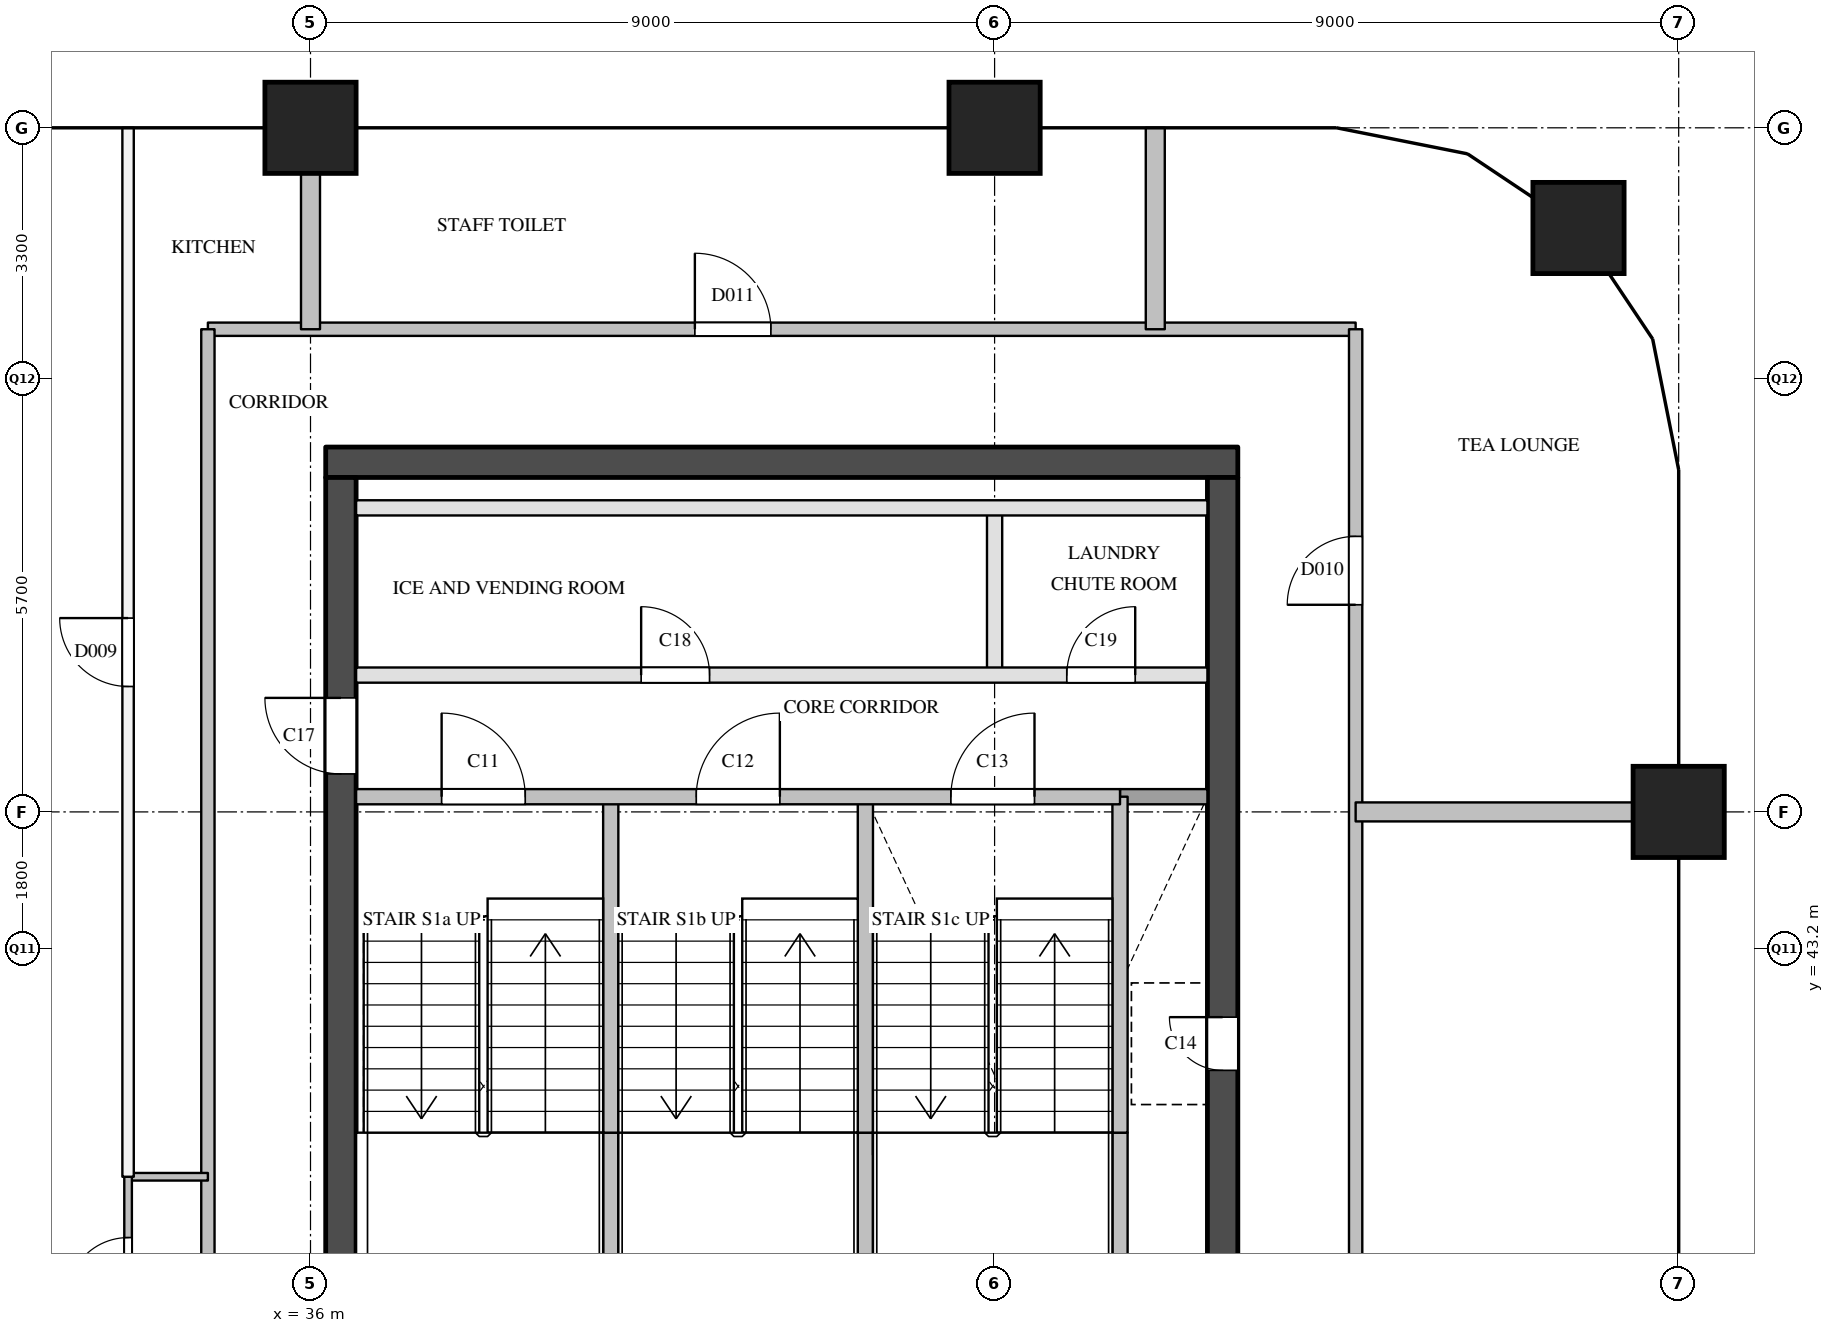
"""IFC4 building model, lengths in metres.
Left out: names, types, materials, properties, quantities, classifications, styles, units other than length and angle.
Written with IfcOpenShell. Run it as: python <this file> out.ifc"""

import sys

from ifc_helpers import new_model, si_unit, direction, frame, frame_2d, origin, origin_2d, place, context, subcontext, project, spatial, rectangle, extrude, element, fill, save


model = new_model("IFC4")
c1 = context("Model", 3, precision=1e-05, world=origin(), true_north=direction((0.0, 1.0)))
c2 = subcontext(c1, "Body", "Model", "MODEL_VIEW")
j1 = project(units=[si_unit("LENGTHUNIT", "METRE"), si_unit("PLANEANGLEUNIT", "RADIAN")], contexts=[c1])
p1 = place(None, origin())
s1 = spatial("IfcSite", under=j1, at=p1, CompositionType="ELEMENT")
p2 = place(p1, origin())
s2 = spatial("IfcBuilding", under=s1, at=p2, CompositionType="ELEMENT")
p3 = place(p2, frame((0.0, 0.0, 269.6)))
s3 = spatial("IfcBuildingStorey", under=s2, at=p3, CompositionType="ELEMENT", Elevation=269.6)
for number, where, z_axis, x_axis in (
    (1, (36.0, 54.0, 0.0), (0.0, 0.0, 1.0), (1.0, 0.0, 0.0)),
    (2, (45.0, 54.0, 0.0), (0.0, 0.0, 1.0), (1.0, 0.0, 0.0)),
    (3, (54.0, 45.0, 0.0), (0.0, 0.0, 1.0), (1.0, 0.0, 0.0)),
    (4, (52.682, 52.682, 0.0), (0.0, 0.0, 1.0), (1.0, 0.0, 0.0)),
):
    element("IfcColumn", number, at=place(p3, frame(where, z_axis=z_axis, x_axis=x_axis)), inside=s3, PredefinedType="COLUMN", context=c2, shape_type="SweptSolid", body=[
        extrude(rectangle(XDim=1.2, YDim=1.2, at=origin_2d()), origin(), (0.0, 0.0, 1.0), 3.9),
    ])
p4 = place(p3, frame((36.2, 49.6, 0.0), z_axis=(0.0, 0.0, 1.0), x_axis=(1.0, 0.0, 0.0)))
e5 = element("IfcWall", 5, at=p4, inside=s3, PredefinedType="SHEAR", context=c2, shape_type="SweptSolid", body=[
    extrude(rectangle(XDim=12.0, YDim=0.4, at=frame_2d((6.0, 0.0))), origin(), (0.0, 0.0, 1.0), 3.6),
])
p5 = place(p3, frame((36.4, 29.1, 0.0), z_axis=(0.0, 0.0, 1.0), x_axis=(0.0, 1.0, 0.0)))
e6 = element("IfcWall", 6, at=p5, inside=s3, PredefinedType="SHEAR", context=c2, shape_type="SweptSolid", body=[
    extrude(rectangle(XDim=20.3, YDim=0.4, at=frame_2d((10.15, 0.0))), origin(), (0.0, 0.0, 1.0), 3.6),
])
p6 = place(p5, frame((3.6, 0.0, 0.0)))
e7 = element("IfcOpeningElement", 7, at=p6, cuts=e6, PredefinedType="OPENING", context=c2, shape_type="SweptSolid", body=[
    extrude(rectangle(XDim=1.8, YDim=2.1, at=frame_2d((0.9, 1.05))), frame((0.0, 0.21, 0.0), z_axis=(0.0, -1.0, 0.0), x_axis=(1.0, 0.0, 0.0)), (0.0, 0.0, 1.0), 0.42),
])
p7 = place(p5, frame((16.4, 0.0, 0.0)))
e8 = element("IfcOpeningElement", 8, at=p7, cuts=e6, PredefinedType="OPENING", context=c2, shape_type="SweptSolid", body=[
    extrude(rectangle(XDim=1.0, YDim=2.1, at=frame_2d((0.5, 1.05))), frame((0.0, 0.21, 0.0), z_axis=(0.0, -1.0, 0.0), x_axis=(1.0, 0.0, 0.0)), (0.0, 0.0, 1.0), 0.42),
])
p8 = place(p3, frame((48.0, 29.1, 0.0), z_axis=(0.0, 0.0, 1.0), x_axis=(0.0, 1.0, 0.0)))
e9 = element("IfcWall", 9, at=p8, inside=s3, PredefinedType="SHEAR", context=c2, shape_type="SweptSolid", body=[
    extrude(rectangle(XDim=20.3, YDim=0.4, at=frame_2d((10.15, 0.0))), origin(), (0.0, 0.0, 1.0), 3.6),
])
p9 = place(p8, frame((12.5, 0.0, 0.0)))
e10 = element("IfcOpeningElement", 10, at=p9, cuts=e9, PredefinedType="OPENING", context=c2, shape_type="SweptSolid", body=[
    extrude(rectangle(XDim=0.7, YDim=2.1, at=frame_2d((0.35, 1.05))), frame((0.0, 0.21, 0.0), z_axis=(0.0, -1.0, 0.0), x_axis=(1.0, 0.0, 0.0)), (0.0, 0.0, 1.0), 0.42),
])
p10 = place(p8, frame((3.9, 0.0, 0.0)))
e11 = element("IfcOpeningElement", 11, at=p10, cuts=e9, PredefinedType="OPENING", context=c2, shape_type="SweptSolid", body=[
    extrude(rectangle(XDim=1.8, YDim=2.1, at=frame_2d((0.9, 1.05))), frame((0.0, 0.21, 0.0), z_axis=(0.0, -1.0, 0.0), x_axis=(1.0, 0.0, 0.0)), (0.0, 0.0, 1.0), 0.42),
])
p11 = place(p3, frame((39.95, 39.0, 0.0), z_axis=(0.0, 0.0, 1.0), x_axis=(0.0, 1.0, 0.0)))
e12 = element("IfcWall", 12, at=p11, inside=s3, PredefinedType="SOLIDWALL", context=c2, shape_type="SweptSolid", body=[
    extrude(rectangle(XDim=1.78, YDim=0.2, at=frame_2d((0.89, 0.0))), origin(), (0.0, 0.0, 1.0), 3.6),
])
p12 = place(p3, frame((39.95, 40.78, 0.0), z_axis=(0.0, 0.0, 1.0), x_axis=(0.0, 1.0, 0.0)))
e13 = element("IfcWall", 13, at=p12, inside=s3, PredefinedType="SOLIDWALL", context=c2, shape_type="SweptSolid", body=[
    extrude(rectangle(XDim=4.42, YDim=0.2, at=frame_2d((2.21, 0.0))), origin(), (0.0, 0.0, 1.0), 3.6),
])
p13 = place(p3, frame((43.3, 39.0, 0.0), z_axis=(0.0, 0.0, 1.0), x_axis=(0.0, 1.0, 0.0)))
e14 = element("IfcWall", 14, at=p13, inside=s3, PredefinedType="SOLIDWALL", context=c2, shape_type="SweptSolid", body=[
    extrude(rectangle(XDim=1.78, YDim=0.2, at=frame_2d((0.89, 0.0))), origin(), (0.0, 0.0, 1.0), 3.6),
])
p14 = place(p3, frame((43.3, 40.78, 0.0), z_axis=(0.0, 0.0, 1.0), x_axis=(0.0, 1.0, 0.0)))
e15 = element("IfcWall", 15, at=p14, inside=s3, PredefinedType="SOLIDWALL", context=c2, shape_type="SweptSolid", body=[
    extrude(rectangle(XDim=4.42, YDim=0.2, at=frame_2d((2.21, 0.0))), origin(), (0.0, 0.0, 1.0), 3.6),
])
p15 = place(p3, frame((45.0, 46.8, 0.0), z_axis=(0.0, 0.0, 1.0), x_axis=(0.0, 1.0, 0.0)))
e16 = element("IfcWall", 16, at=p15, inside=s3, PredefinedType="PARTITIONING", context=c2, shape_type="SweptSolid", body=[
    extrude(rectangle(XDim=2.2, YDim=0.2, at=frame_2d((1.1, 0.0))), origin(), (0.0, 0.0, 1.0), 3.6),
])
p16 = place(p3, frame((46.65, 39.0, 0.0), z_axis=(0.0, 0.0, 1.0), x_axis=(0.0, 1.0, 0.0)))
e17 = element("IfcWall", 17, at=p16, inside=s3, PredefinedType="SOLIDWALL", context=c2, shape_type="SweptSolid", body=[
    extrude(rectangle(XDim=1.78, YDim=0.2, at=frame_2d((0.89, 0.0))), origin(), (0.0, 0.0, 1.0), 3.6),
])
p17 = place(p3, frame((46.65, 40.78, 0.0), z_axis=(0.0, 0.0, 1.0), x_axis=(0.0, 1.0, 0.0)))
e18 = element("IfcWall", 18, at=p17, inside=s3, PredefinedType="SOLIDWALL", context=c2, shape_type="SweptSolid", body=[
    extrude(rectangle(XDim=4.42, YDim=0.2, at=frame_2d((2.21, 0.0))), origin(), (0.0, 0.0, 1.0), 3.6),
])
p18 = place(p3, frame((46.65, 45.2, 0.0), z_axis=(0.0, 0.0, 1.0), x_axis=(1.0, 0.0, 0.0)))
e19 = element("IfcWall", 19, at=p18, inside=s3, PredefinedType="SOLIDWALL", context=c2, shape_type="SweptSolid", body=[
    extrude(rectangle(XDim=1.15, YDim=0.2, at=frame_2d((0.575, 0.0))), origin(), (0.0, 0.0, 1.0), 3.6),
])
p19 = place(p3, frame((36.6, 45.2, 0.0), z_axis=(0.0, 0.0, 1.0), x_axis=(1.0, 0.0, 0.0)))
e20 = element("IfcWall", 20, at=p19, inside=s3, PredefinedType="SOLIDWALL", context=c2, shape_type="SweptSolid", body=[
    extrude(rectangle(XDim=10.05, YDim=0.2, at=frame_2d((5.025, 0.0))), origin(), (0.0, 0.0, 1.0), 3.6),
])
p20 = place(p19, frame((1.125, 0.0, 0.0)))
e21 = element("IfcOpeningElement", 21, at=p20, cuts=e20, PredefinedType="OPENING", context=c2, shape_type="SweptSolid", body=[
    extrude(rectangle(XDim=1.1, YDim=2.1, at=frame_2d((0.55, 1.05))), frame((0.0, 0.11, 0.0), z_axis=(0.0, -1.0, 0.0), x_axis=(1.0, 0.0, 0.0)), (0.0, 0.0, 1.0), 0.22),
])
p21 = place(p19, frame((4.475, 0.0, 0.0)))
e22 = element("IfcOpeningElement", 22, at=p21, cuts=e20, PredefinedType="OPENING", context=c2, shape_type="SweptSolid", body=[
    extrude(rectangle(XDim=1.1, YDim=2.1, at=frame_2d((0.55, 1.05))), frame((0.0, 0.11, 0.0), z_axis=(0.0, -1.0, 0.0), x_axis=(1.0, 0.0, 0.0)), (0.0, 0.0, 1.0), 0.22),
])
p22 = place(p19, frame((7.825, 0.0, 0.0)))
e23 = element("IfcOpeningElement", 23, at=p22, cuts=e20, PredefinedType="OPENING", context=c2, shape_type="SweptSolid", body=[
    extrude(rectangle(XDim=1.1, YDim=2.1, at=frame_2d((0.55, 1.05))), frame((0.0, 0.11, 0.0), z_axis=(0.0, -1.0, 0.0), x_axis=(1.0, 0.0, 0.0)), (0.0, 0.0, 1.0), 0.22),
])
p23 = place(p3, frame((36.6, 46.8, 0.0), z_axis=(0.0, 0.0, 1.0), x_axis=(1.0, 0.0, 0.0)))
e24 = element("IfcWall", 24, at=p23, inside=s3, PredefinedType="PARTITIONING", context=c2, shape_type="SweptSolid", body=[
    extrude(rectangle(XDim=11.2, YDim=0.2, at=frame_2d((5.6, 0.0))), origin(), (0.0, 0.0, 1.0), 3.6),
])
p24 = place(p23, frame((3.75, 0.0, 0.0)))
e25 = element("IfcOpeningElement", 25, at=p24, cuts=e24, PredefinedType="OPENING", context=c2, shape_type="SweptSolid", body=[
    extrude(rectangle(XDim=0.9, YDim=2.1, at=frame_2d((0.45, 1.05))), frame((0.0, 0.11, 0.0), z_axis=(0.0, -1.0, 0.0), x_axis=(1.0, 0.0, 0.0)), (0.0, 0.0, 1.0), 0.22),
])
p25 = place(p23, frame((9.35, 0.0, 0.0)))
e26 = element("IfcOpeningElement", 26, at=p25, cuts=e24, PredefinedType="OPENING", context=c2, shape_type="SweptSolid", body=[
    extrude(rectangle(XDim=0.9, YDim=2.1, at=frame_2d((0.45, 1.05))), frame((0.0, 0.11, 0.0), z_axis=(0.0, -1.0, 0.0), x_axis=(1.0, 0.0, 0.0)), (0.0, 0.0, 1.0), 0.22),
])
p26 = place(p3, frame((36.6, 49.0, 0.0), z_axis=(0.0, 0.0, 1.0), x_axis=(1.0, 0.0, 0.0)))
e27 = element("IfcWall", 27, at=p26, inside=s3, PredefinedType="PARTITIONING", context=c2, shape_type="SweptSolid", body=[
    extrude(rectangle(XDim=11.2, YDim=0.2, at=frame_2d((5.6, 0.0))), origin(), (0.0, 0.0, 1.0), 3.6),
])
p27 = place(p3, frame((34.65, 51.35, 0.0), z_axis=(0.0, 0.0, 1.0), x_axis=(1.0, 0.0, 0.0)))
e28 = element("IfcWall", 28, at=p27, inside=s3, PredefinedType="PARTITIONING", context=c2, shape_type="SweptSolid", body=[
    extrude(rectangle(XDim=15.1, YDim=0.175, at=frame_2d((7.55, 0.0))), origin(), (0.0, 0.0, 1.0), 3.6),
])
p28 = place(p27, frame((6.407, 0.0, 0.0)))
e29 = element("IfcOpeningElement", 29, at=p28, cuts=e28, PredefinedType="OPENING", context=c2, shape_type="SweptSolid", body=[
    extrude(rectangle(XDim=1.0, YDim=2.1, at=frame_2d((0.5, 1.05))), frame((0.0, 0.097, 0.0), z_axis=(0.0, -1.0, 0.0), x_axis=(1.0, 0.0, 0.0)), (0.0, 0.0, 1.0), 0.195),
])
p29 = place(p3, frame((34.65, 28.5, 0.0), z_axis=(0.0, 0.0, 1.0), x_axis=(0.0, 1.0, 0.0)))
e30 = element("IfcWall", 30, at=p29, inside=s3, PredefinedType="PARTITIONING", context=c2, shape_type="SweptSolid", body=[
    extrude(rectangle(XDim=22.85, YDim=0.175, at=frame_2d((11.425, 0.0))), origin(), (0.0, 0.0, 1.0), 3.6),
])
p30 = place(p29, frame((6.1, 0.0, 0.0)))
e31 = element("IfcOpeningElement", 31, at=p30, cuts=e30, PredefinedType="OPENING", context=c2, shape_type="SweptSolid", body=[
    extrude(rectangle(XDim=1.0, YDim=2.1, at=frame_2d((0.5, 1.05))), frame((0.0, 0.097, 0.0), z_axis=(0.0, -1.0, 0.0), x_axis=(1.0, 0.0, 0.0)), (0.0, 0.0, 1.0), 0.195),
])
p31 = place(p29, frame((7.9, 0.0, 0.0)))
e32 = element("IfcOpeningElement", 32, at=p31, cuts=e30, PredefinedType="OPENING", context=c2, shape_type="SweptSolid", body=[
    extrude(rectangle(XDim=1.0, YDim=2.1, at=frame_2d((0.5, 1.05))), frame((0.0, 0.097, 0.0), z_axis=(0.0, -1.0, 0.0), x_axis=(1.0, 0.0, 0.0)), (0.0, 0.0, 1.0), 0.195),
])
p32 = place(p3, frame((49.75, 28.5, 0.0), z_axis=(0.0, 0.0, 1.0), x_axis=(0.0, 1.0, 0.0)))
e33 = element("IfcWall", 33, at=p32, inside=s3, PredefinedType="PARTITIONING", context=c2, shape_type="SweptSolid", body=[
    extrude(rectangle(XDim=22.85, YDim=0.175, at=frame_2d((11.425, 0.0))), origin(), (0.0, 0.0, 1.0), 3.6),
])
p33 = place(p32, frame((7.8, 0.0, 0.0)))
e34 = element("IfcOpeningElement", 34, at=p33, cuts=e33, PredefinedType="OPENING", context=c2, shape_type="SweptSolid", body=[
    extrude(rectangle(XDim=0.9, YDim=2.1, at=frame_2d((0.45, 1.05))), frame((0.0, 0.097, 0.0), z_axis=(0.0, -1.0, 0.0), x_axis=(1.0, 0.0, 0.0)), (0.0, 0.0, 1.0), 0.195),
])
p34 = place(p32, frame((19.225, 0.0, 0.0)))
e35 = element("IfcOpeningElement", 35, at=p34, cuts=e33, PredefinedType="OPENING", context=c2, shape_type="SweptSolid", body=[
    extrude(rectangle(XDim=0.9, YDim=2.1, at=frame_2d((0.45, 1.05))), frame((0.0, 0.097, 0.0), z_axis=(0.0, -1.0, 0.0), x_axis=(1.0, 0.0, 0.0)), (0.0, 0.0, 1.0), 0.195),
])
p35 = place(p3, frame((33.6, 40.2, 0.0), z_axis=(0.0, 0.0, 1.0), x_axis=(0.0, 1.0, 0.0)))
e36 = element("IfcWall", 36, at=p35, inside=s3, PredefinedType="PARTITIONING", context=c2, shape_type="SweptSolid", body=[
    extrude(rectangle(XDim=13.8, YDim=0.15, at=frame_2d((6.9, 0.0))), origin(), (0.0, 0.0, 1.0), 2.6),
])
p36 = place(p35, frame((6.45, 0.0, 0.0)))
e37 = element("IfcOpeningElement", 37, at=p36, cuts=e36, PredefinedType="OPENING", context=c2, shape_type="SweptSolid", body=[
    extrude(rectangle(XDim=0.9, YDim=2.1, at=frame_2d((0.45, 1.05))), frame((0.0, 0.085, 0.0), z_axis=(0.0, -1.0, 0.0), x_axis=(1.0, 0.0, 0.0)), (0.0, 0.0, 1.0), 0.17),
])
p37 = place(p3, frame((49.75, 45.0, 0.0), z_axis=(0.0, 0.0, 1.0), x_axis=(1.0, 0.0, 0.0)))
e38 = element("IfcWall", 38, at=p37, inside=s3, PredefinedType="PARTITIONING", context=c2, shape_type="SweptSolid", body=[
    extrude(rectangle(XDim=4.25, YDim=0.25, at=frame_2d((2.125, 0.0))), origin(), (0.0, 0.0, 1.0), 3.6),
])
p38 = place(p3, frame((36.0, 51.35, 0.0), z_axis=(0.0, 0.0, 1.0), x_axis=(0.0, 1.0, 0.0)))
e39 = element("IfcWall", 39, at=p38, inside=s3, PredefinedType="PARTITIONING", context=c2, shape_type="SweptSolid", body=[
    extrude(rectangle(XDim=2.65, YDim=0.25, at=frame_2d((1.325, 0.0))), origin(), (0.0, 0.0, 1.0), 3.6),
])
p39 = place(p3, frame((47.114, 51.35, 0.0), z_axis=(0.0, 0.0, 1.0), x_axis=(0.0, 1.0, 0.0)))
e40 = element("IfcWall", 40, at=p39, inside=s3, PredefinedType="PARTITIONING", context=c2, shape_type="SweptSolid", body=[
    extrude(rectangle(XDim=2.65, YDim=0.25, at=frame_2d((1.325, 0.0))), origin(), (0.0, 0.0, 1.0), 2.6),
])
p40 = place(p3, frame((33.6, 40.2, 0.0), z_axis=(0.0, 0.0, 1.0), x_axis=(1.0, 0.0, 0.0)))
e41 = element("IfcWall", 41, at=p40, inside=s3, PredefinedType="PARTITIONING", context=c2, shape_type="SweptSolid", body=[
    extrude(rectangle(XDim=1.05, YDim=0.1, at=frame_2d((0.525, 0.0))), origin(), (0.0, 0.0, 1.0), 3.6),
])
p41 = place(p3, frame((33.6, 37.8, 0.0), z_axis=(0.0, 0.0, 1.0), x_axis=(0.0, 1.0, 0.0)))
e42 = element("IfcWall", 42, at=p41, inside=s3, PredefinedType="PARTITIONING", context=c2, shape_type="SweptSolid", body=[
    extrude(rectangle(XDim=2.4, YDim=0.1, at=frame_2d((1.2, 0.0))), origin(), (0.0, 0.0, 1.0), 3.6),
])
p42 = place(p41, frame((0.8, 0.0, 0.0)))
e43 = element("IfcOpeningElement", 43, at=p42, cuts=e42, PredefinedType="OPENING", context=c2, shape_type="SweptSolid", body=[
    extrude(rectangle(XDim=0.8, YDim=2.1, at=frame_2d((0.4, 1.05))), frame((0.0, 0.06, 0.0), z_axis=(0.0, -1.0, 0.0), x_axis=(1.0, 0.0, 0.0)), (0.0, 0.0, 1.0), 0.12),
])
p43 = place(p20, origin())
e44 = element("IfcDoor", 44, at=p43, inside=s3, OperationType="SINGLE_SWING_LEFT", PredefinedType="DOOR", context=c2, shape_type="SweptSolid", body=[
    extrude(rectangle(XDim=1.1, YDim=2.1, at=frame_2d((0.55, 1.05))), frame((0.0, 0.025, 0.0), z_axis=(0.0, -1.0, 0.0), x_axis=(1.0, 0.0, 0.0)), (0.0, 0.0, 1.0), 0.05),
])
fill(e21, e44)
p44 = place(p21, origin())
e45 = element("IfcDoor", 45, at=p44, inside=s3, OperationType="SINGLE_SWING_RIGHT", PredefinedType="DOOR", context=c2, shape_type="SweptSolid", body=[
    extrude(rectangle(XDim=1.1, YDim=2.1, at=frame_2d((0.55, 1.05))), frame((0.0, 0.025, 0.0), z_axis=(0.0, -1.0, 0.0), x_axis=(1.0, 0.0, 0.0)), (0.0, 0.0, 1.0), 0.05),
])
fill(e22, e45)
p45 = place(p22, origin())
e46 = element("IfcDoor", 46, at=p45, inside=s3, OperationType="SINGLE_SWING_RIGHT", PredefinedType="DOOR", context=c2, shape_type="SweptSolid", body=[
    extrude(rectangle(XDim=1.1, YDim=2.1, at=frame_2d((0.55, 1.05))), frame((0.0, 0.025, 0.0), z_axis=(0.0, -1.0, 0.0), x_axis=(1.0, 0.0, 0.0)), (0.0, 0.0, 1.0), 0.05),
])
fill(e23, e46)
p46 = place(p9, origin())
e47 = element("IfcDoor", 47, at=p46, inside=s3, OperationType="SINGLE_SWING_RIGHT", PredefinedType="DOOR", context=c2, shape_type="SweptSolid", body=[
    extrude(rectangle(XDim=0.7, YDim=2.1, at=frame_2d((0.35, 1.05))), frame((0.0, 0.025, 0.0), z_axis=(0.0, -1.0, 0.0), x_axis=(1.0, 0.0, 0.0)), (0.0, 0.0, 1.0), 0.05),
])
fill(e10, e47)
p47 = place(p7, origin())
e48 = element("IfcDoor", 48, at=p47, inside=s3, OperationType="SINGLE_SWING_RIGHT", PredefinedType="DOOR", context=c2, shape_type="SweptSolid", body=[
    extrude(rectangle(XDim=1.0, YDim=2.1, at=frame_2d((0.5, 1.05))), frame((0.0, 0.025, 0.0), z_axis=(0.0, -1.0, 0.0), x_axis=(1.0, 0.0, 0.0)), (0.0, 0.0, 1.0), 0.05),
])
fill(e8, e48)
p48 = place(p24, origin())
e49 = element("IfcDoor", 49, at=p48, inside=s3, OperationType="SINGLE_SWING_LEFT", PredefinedType="DOOR", context=c2, shape_type="SweptSolid", body=[
    extrude(rectangle(XDim=0.9, YDim=2.1, at=frame_2d((0.45, 1.05))), frame((0.0, 0.025, 0.0), z_axis=(0.0, -1.0, 0.0), x_axis=(1.0, 0.0, 0.0)), (0.0, 0.0, 1.0), 0.05),
])
fill(e25, e49)
p49 = place(p25, origin())
e50 = element("IfcDoor", 50, at=p49, inside=s3, OperationType="SINGLE_SWING_RIGHT", PredefinedType="DOOR", context=c2, shape_type="SweptSolid", body=[
    extrude(rectangle(XDim=0.9, YDim=2.1, at=frame_2d((0.45, 1.05))), frame((0.0, 0.025, 0.0), z_axis=(0.0, -1.0, 0.0), x_axis=(1.0, 0.0, 0.0)), (0.0, 0.0, 1.0), 0.05),
])
fill(e26, e50)
p50 = place(p42, origin())
e51 = element("IfcDoor", 51, at=p50, inside=s3, OperationType="SINGLE_SWING_LEFT", PredefinedType="DOOR", context=c2, shape_type="SweptSolid", body=[
    extrude(rectangle(XDim=0.8, YDim=2.1, at=frame_2d((0.4, 1.05))), frame((0.0, 0.025, 0.0), z_axis=(0.0, -1.0, 0.0), x_axis=(1.0, 0.0, 0.0)), (0.0, 0.0, 1.0), 0.05),
])
fill(e43, e51)
p51 = place(p36, origin())
e52 = element("IfcDoor", 52, at=p51, inside=s3, OperationType="SINGLE_SWING_RIGHT", PredefinedType="DOOR", context=c2, shape_type="SweptSolid", body=[
    extrude(rectangle(XDim=0.9, YDim=2.1, at=frame_2d((0.45, 1.05))), frame((0.0, 0.025, 0.0), z_axis=(0.0, -1.0, 0.0), x_axis=(1.0, 0.0, 0.0)), (0.0, 0.0, 1.0), 0.05),
])
fill(e37, e52)
p52 = place(p34, origin())
e53 = element("IfcDoor", 53, at=p52, inside=s3, OperationType="SINGLE_SWING_LEFT", PredefinedType="DOOR", context=c2, shape_type="SweptSolid", body=[
    extrude(rectangle(XDim=0.9, YDim=2.1, at=frame_2d((0.45, 1.05))), frame((0.0, 0.025, 0.0), z_axis=(0.0, -1.0, 0.0), x_axis=(1.0, 0.0, 0.0)), (0.0, 0.0, 1.0), 0.05),
])
fill(e35, e53)
p53 = place(p28, origin())
e54 = element("IfcDoor", 54, at=p53, inside=s3, OperationType="SINGLE_SWING_LEFT", PredefinedType="DOOR", context=c2, shape_type="SweptSolid", body=[
    extrude(rectangle(XDim=1.0, YDim=2.1, at=frame_2d((0.5, 1.05))), frame((0.0, 0.025, 0.0), z_axis=(0.0, -1.0, 0.0), x_axis=(1.0, 0.0, 0.0)), (0.0, 0.0, 1.0), 0.05),
])
fill(e29, e54)
save(model, sys.argv[1])
